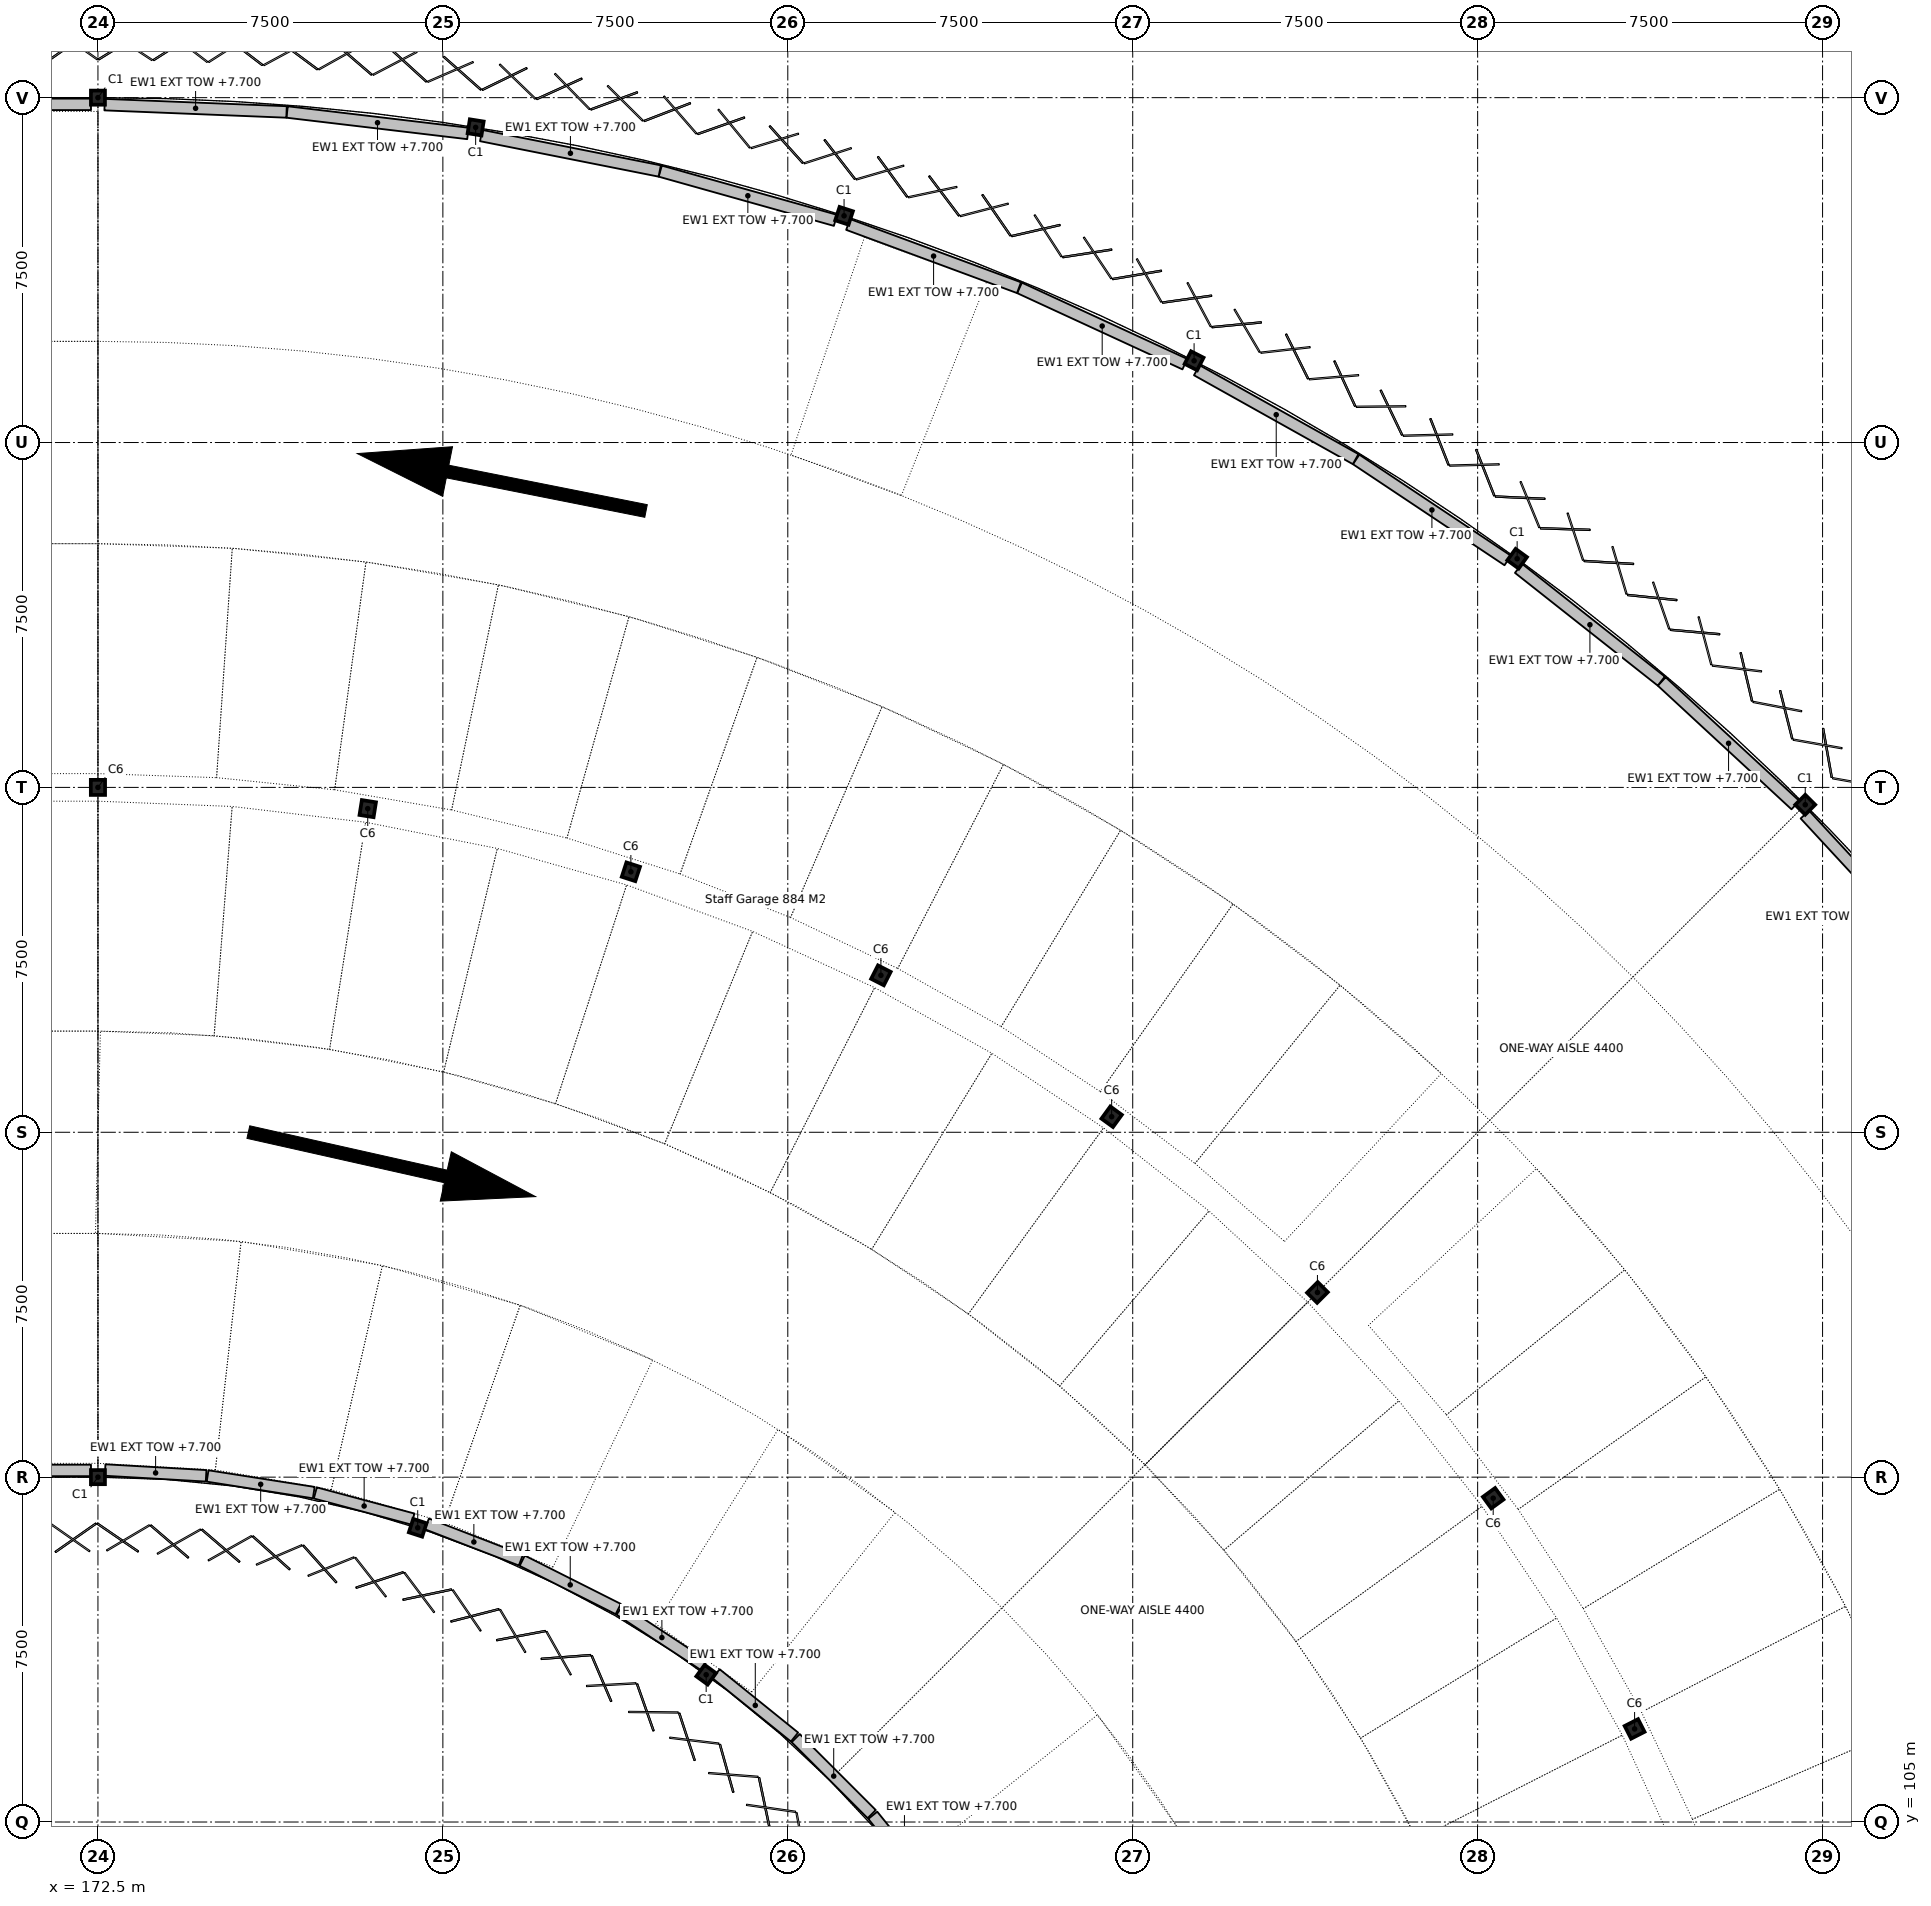
"""IFC4 building model, lengths in metres.
Left out: names, types, materials, properties, quantities, classifications, styles, units other than length and angle.
Written with IfcOpenShell. Run it as: python <this file> out.ifc"""

import sys

from ifc_helpers import new_model, si_unit, direction, frame, frame_2d, origin, origin_2d, place, context, subcontext, project, spatial, rectangle, i_section, extrude, element, save


model = new_model("IFC4")
c1 = context("Model", 3, precision=1e-05, world=origin(), true_north=direction((0.0, 1.0)))
c2 = subcontext(c1, "Body", "Model", "MODEL_VIEW")
j1 = project(units=[si_unit("LENGTHUNIT", "METRE"), si_unit("PLANEANGLEUNIT", "RADIAN")], contexts=[c1])
p1 = place(None, origin())
s1 = spatial("IfcSite", under=j1, at=p1, CompositionType="ELEMENT")
p2 = place(p1, origin())
s2 = spatial("IfcBuilding", under=s1, at=p2, CompositionType="ELEMENT")
p3 = place(p2, frame((0.0, 0.0, 6.6)))
s3 = spatial("IfcBuildingStorey", under=s2, at=p3, CompositionType="ELEMENT", Elevation=6.6)
p4 = place(p3, frame((172.5, 112.5, 0.0), z_axis=(0.0, 0.0, 1.0), x_axis=(1.0, 0.0, 0.0)))
e1 = element("IfcColumn", 1, at=p4, inside=s3, PredefinedType="COLUMN", context=c2, shape_type="SweptSolid", body=[
    extrude(i_section(OverallWidth=0.305, OverallDepth=0.307, WebThickness=0.01, FlangeThickness=0.015, FilletRadius=0.015, at=origin_2d()), origin(), (0.0, 0.0, 1.0), 3.3),
])
p5 = place(p3, frame((172.5, 127.5, 0.0), z_axis=(0.0, 0.0, 1.0), x_axis=(1.0, 0.0, 0.0)))
e2 = element("IfcColumn", 2, at=p5, inside=s3, PredefinedType="COLUMN", context=c2, shape_type="SweptSolid", body=[
    extrude(i_section(OverallWidth=0.31, OverallDepth=0.328, WebThickness=0.015, FlangeThickness=0.025, FilletRadius=0.015, at=origin_2d()), origin(), (0.0, 0.0, 1.0), 3.3),
])
for number, where, z_axis, x_axis in (
    (3, (172.5, 142.5, 0.0), (0.0, 0.0, 1.0), (1.0, 0.0, 0.0)),
    (4, (179.453, 111.399, 0.0), (0.0, 0.0, 1.0), (-0.951, 0.309, 0.0)),
    (5, (185.725, 108.203, 0.0), (0.0, 0.0, 1.0), (-0.809, 0.588, 0.0)),
):
    element("IfcColumn", number, at=place(p3, frame(where, z_axis=z_axis, x_axis=x_axis)), inside=s3, PredefinedType="COLUMN", context=c2, shape_type="SweptSolid", body=[
        extrude(i_section(OverallWidth=0.305, OverallDepth=0.307, WebThickness=0.01, FlangeThickness=0.015, FilletRadius=0.015, at=origin_2d()), origin(), (0.0, 0.0, 1.0), 3.3),
    ])
for number, where, z_axis, x_axis in (
    (6, (178.366, 127.038, 0.0), (0.0, 0.0, 1.0), (-0.988, 0.156, 0.0)),
    (7, (184.088, 125.665, 0.0), (0.0, 0.0, 1.0), (-0.951, 0.309, 0.0)),
    (8, (189.525, 123.413, 0.0), (0.0, 0.0, 1.0), (-0.891, 0.454, 0.0)),
    (9, (194.542, 120.338, 0.0), (0.0, 0.0, 1.0), (-0.809, 0.588, 0.0)),
    (10, (199.017, 116.517, 0.0), (0.0, 0.0, 1.0), (-0.707, 0.707, 0.0)),
    (11, (202.838, 112.042, 0.0), (0.0, 0.0, 1.0), (-0.588, 0.809, 0.0)),
    (12, (205.913, 107.025, 0.0), (0.0, 0.0, 1.0), (-0.454, 0.891, 0.0)),
):
    element("IfcColumn", number, at=place(p3, frame(where, z_axis=z_axis, x_axis=x_axis)), inside=s3, PredefinedType="COLUMN", context=c2, shape_type="SweptSolid", body=[
        extrude(i_section(OverallWidth=0.31, OverallDepth=0.328, WebThickness=0.015, FlangeThickness=0.025, FilletRadius=0.015, at=origin_2d()), origin(), (0.0, 0.0, 1.0), 3.3),
    ])
for number, where, z_axis, x_axis in (
    (13, (180.713, 141.854, 0.0), (0.0, 0.0, 1.0), (-0.988, 0.156, 0.0)),
    (14, (188.723, 139.93, 0.0), (0.0, 0.0, 1.0), (-0.951, 0.309, 0.0)),
    (15, (196.334, 136.778, 0.0), (0.0, 0.0, 1.0), (-0.891, 0.454, 0.0)),
    (16, (203.359, 132.473, 0.0), (0.0, 0.0, 1.0), (-0.809, 0.588, 0.0)),
    (17, (209.623, 127.123, 0.0), (0.0, 0.0, 1.0), (-0.707, 0.707, 0.0)),
):
    element("IfcColumn", number, at=place(p3, frame(where, z_axis=z_axis, x_axis=x_axis)), inside=s3, PredefinedType="COLUMN", context=c2, shape_type="SweptSolid", body=[
        extrude(i_section(OverallWidth=0.305, OverallDepth=0.307, WebThickness=0.01, FlangeThickness=0.015, FilletRadius=0.015, at=origin_2d()), origin(), (0.0, 0.0, 1.0), 3.3),
    ])
p6 = place(p3, frame((165.152, 112.646, 0.0), z_axis=(0.0, 0.0, 1.0), x_axis=(1.0, 0.0, 0.0)))
e18 = element("IfcWall", 18, at=p6, inside=s3, PredefinedType="SOLIDWALL", context=c2, shape_type="SweptSolid", body=[
    extrude(rectangle(XDim=7.197, YDim=0.25, at=frame_2d((3.598, 0.0))), origin(), (0.0, 0.0, 1.0), 1.1),
])
p7 = place(p3, frame((172.656, 112.655, 0.0), z_axis=(0.0, 0.0, 1.0), x_axis=(0.998364643885, -0.057166754681, 0.0)))
e19 = element("IfcWall", 19, at=p7, inside=s3, PredefinedType="SOLIDWALL", context=c2, shape_type="SweptSolid", body=[
    extrude(rectangle(XDim=2.199, YDim=0.25, at=frame_2d((1.1, 0.0))), origin(), (0.0, 0.0, 1.0), 1.1),
])
p8 = place(p3, frame((174.884, 112.525, 0.0), z_axis=(0.0, 0.0, 1.0), x_axis=(0.987958694972, -0.154717862668, 0.0)))
e20 = element("IfcWall", 20, at=p8, inside=s3, PredefinedType="SOLIDWALL", context=c2, shape_type="SweptSolid", body=[
    extrude(rectangle(XDim=2.337, YDim=0.25, at=frame_2d((1.168, 0.0))), origin(), (0.0, 0.0, 1.0), 1.1),
])
p9 = place(p3, frame((177.227, 112.156, 0.0), z_axis=(0.0, 0.0, 1.0), x_axis=(0.965933668704, -0.258789775039, 0.0)))
e21 = element("IfcWall", 21, at=p9, inside=s3, PredefinedType="SOLIDWALL", context=c2, shape_type="SweptSolid", body=[
    extrude(rectangle(XDim=2.197, YDim=0.25, at=frame_2d((1.099, 0.0))), origin(), (0.0, 0.0, 1.0), 1.1),
])
p10 = place(p3, frame((179.652, 111.484, 0.0), z_axis=(0.0, 0.0, 1.0), x_axis=(0.933015016795, -0.359837433343, 0.0)))
e22 = element("IfcWall", 22, at=p10, inside=s3, PredefinedType="SOLIDWALL", context=c2, shape_type="SweptSolid", body=[
    extrude(rectangle(XDim=2.191, YDim=0.25, at=frame_2d((1.096, 0.0))), origin(), (0.0, 0.0, 1.0), 1.1),
])
p11 = place(p3, frame((181.725, 110.682, 0.0), z_axis=(0.0, 0.0, 1.0), x_axis=(0.89321234847, -0.449635074856, 0.0)))
e23 = element("IfcWall", 23, at=p11, inside=s3, PredefinedType="SOLIDWALL", context=c2, shape_type="SweptSolid", body=[
    extrude(rectangle(XDim=2.337, YDim=0.25, at=frame_2d((1.169, 0.0))), origin(), (0.0, 0.0, 1.0), 1.1),
])
p12 = place(p3, frame((183.845, 109.613, 0.0), z_axis=(0.0, 0.0, 1.0), x_axis=(0.835931493831, -0.548833797813, 0.0)))
e24 = element("IfcWall", 24, at=p12, inside=s3, PredefinedType="SOLIDWALL", context=c2, shape_type="SweptSolid", body=[
    extrude(rectangle(XDim=2.195, YDim=0.25, at=frame_2d((1.097, 0.0))), origin(), (0.0, 0.0, 1.0), 1.1),
])
p13 = place(p3, frame((185.94, 108.225, 0.0), z_axis=(0.0, 0.0, 1.0), x_axis=(0.7781901536, -0.628028729311, 0.0)))
e25 = element("IfcWall", 25, at=p13, inside=s3, PredefinedType="SOLIDWALL", context=c2, shape_type="SweptSolid", body=[
    extrude(rectangle(XDim=2.193, YDim=0.25, at=frame_2d((1.097, 0.0))), origin(), (0.0, 0.0, 1.0), 1.1),
])
p14 = place(p3, frame((187.672, 106.824, 0.0), z_axis=(0.0, 0.0, 1.0), x_axis=(0.707106781187, -0.707106781187, 0.0)))
e26 = element("IfcWall", 26, at=p14, inside=s3, PredefinedType="SOLIDWALL", context=c2, shape_type="SweptSolid", body=[
    extrude(rectangle(XDim=2.337, YDim=0.25, at=frame_2d((1.168, 0.0))), origin(), (0.0, 0.0, 1.0), 1.1),
])
p15 = place(p3, frame((189.348, 105.146, 0.0), z_axis=(0.0, 0.0, 1.0), x_axis=(0.628070132688, -0.778156737698, 0.0)))
e27 = element("IfcWall", 27, at=p15, inside=s3, PredefinedType="SOLIDWALL", context=c2, shape_type="SweptSolid", body=[
    extrude(rectangle(XDim=2.193, YDim=0.25, at=frame_2d((1.096, 0.0))), origin(), (0.0, 0.0, 1.0), 1.1),
])
for number, where, z_axis, x_axis in (
    (28, (212.303, 124.003, 0.0), (0.0, 0.0, 1.0), (-0.679, 0.734, 0.0)),
    (29, (209.409, 127.115, 0.0), (0.0, 0.0, 1.0), (-0.734, 0.679, 0.0)),
):
    element("IfcWall", number, at=place(p3, frame(where, z_axis=z_axis, x_axis=x_axis)), inside=s3, PredefinedType="SOLIDWALL", context=c2, shape_type="SweptSolid", body=[
        extrude(rectangle(XDim=3.958, YDim=0.25, at=frame_2d((1.979, 0.0))), origin(), (0.0, 0.0, 1.0), 1.1),
    ])
p16 = place(p3, frame((206.494, 129.811, 0.0), z_axis=(0.0, 0.0, 1.0), x_axis=(-0.784694773209, 0.619882337946, 0.0)))
e30 = element("IfcWall", 30, at=p16, inside=s3, PredefinedType="SOLIDWALL", context=c2, shape_type="SweptSolid", body=[
    extrude(rectangle(XDim=3.957, YDim=0.25, at=frame_2d((1.978, 0.0))), origin(), (0.0, 0.0, 1.0), 1.1),
])
p17 = place(p3, frame((203.154, 132.435, 0.0), z_axis=(0.0, 0.0, 1.0), x_axis=(-0.83203132877, 0.554728643524, 0.0)))
e31 = element("IfcWall", 31, at=p17, inside=s3, PredefinedType="SOLIDWALL", context=c2, shape_type="SweptSolid", body=[
    extrude(rectangle(XDim=3.961, YDim=0.25, at=frame_2d((1.98, 0.0))), origin(), (0.0, 0.0, 1.0), 1.1),
])
p18 = place(p3, frame((199.847, 134.639, 0.0), z_axis=(0.0, 0.0, 1.0), x_axis=(-0.872675295028, 0.488300961957, 0.0)))
e32 = element("IfcWall", 32, at=p18, inside=s3, PredefinedType="SOLIDWALL", context=c2, shape_type="SweptSolid", body=[
    extrude(rectangle(XDim=3.958, YDim=0.25, at=frame_2d((1.979, 0.0))), origin(), (0.0, 0.0, 1.0), 1.1),
])
p19 = place(p3, frame((196.133, 136.704, 0.0), z_axis=(0.0, 0.0, 1.0), x_axis=(-0.907988262617, 0.418995602542, 0.0)))
e33 = element("IfcWall", 33, at=p19, inside=s3, PredefinedType="SOLIDWALL", context=c2, shape_type="SweptSolid", body=[
    extrude(rectangle(XDim=3.959, YDim=0.25, at=frame_2d((1.979, 0.0))), origin(), (0.0, 0.0, 1.0), 1.1),
])
p20 = place(p3, frame((192.527, 138.367, 0.0), z_axis=(0.0, 0.0, 1.0), x_axis=(-0.93784539105, 0.347053342422, 0.0)))
e34 = element("IfcWall", 34, at=p20, inside=s3, PredefinedType="SOLIDWALL", context=c2, shape_type="SweptSolid", body=[
    extrude(rectangle(XDim=3.96, YDim=0.25, at=frame_2d((1.98, 0.0))), origin(), (0.0, 0.0, 1.0), 1.1),
])
p21 = place(p3, frame((188.536, 139.832, 0.0), z_axis=(0.0, 0.0, 1.0), x_axis=(-0.962732314644, 0.270456078393, 0.0)))
e35 = element("IfcWall", 35, at=p21, inside=s3, PredefinedType="SOLIDWALL", context=c2, shape_type="SweptSolid", body=[
    extrude(rectangle(XDim=3.957, YDim=0.25, at=frame_2d((1.978, 0.0))), origin(), (0.0, 0.0, 1.0), 1.1),
])
p22 = place(p3, frame((184.715, 140.905, 0.0), z_axis=(0.0, 0.0, 1.0), x_axis=(-0.980850156695, 0.194763882975, 0.0)))
e36 = element("IfcWall", 36, at=p22, inside=s3, PredefinedType="SOLIDWALL", context=c2, shape_type="SweptSolid", body=[
    extrude(rectangle(XDim=3.959, YDim=0.25, at=frame_2d((1.979, 0.0))), origin(), (0.0, 0.0, 1.0), 1.1),
])
p23 = place(p3, frame((180.544, 141.721, 0.0), z_axis=(0.0, 0.0, 1.0), x_axis=(-0.993030098497, 0.117861034608, 0.0)))
e37 = element("IfcWall", 37, at=p23, inside=s3, PredefinedType="SOLIDWALL", context=c2, shape_type="SweptSolid", body=[
    extrude(rectangle(XDim=3.958, YDim=0.25, at=frame_2d((1.979, 0.0))), origin(), (0.0, 0.0, 1.0), 1.1),
])
p24 = place(p3, frame((176.601, 142.189, 0.0), z_axis=(0.0, 0.0, 1.0), x_axis=(-0.999191275027, 0.040209400773, 0.0)))
e38 = element("IfcWall", 38, at=p24, inside=s3, PredefinedType="SOLIDWALL", context=c2, shape_type="SweptSolid", body=[
    extrude(rectangle(XDim=3.959, YDim=0.25, at=frame_2d((1.979, 0.0))), origin(), (0.0, 0.0, 1.0), 1.1),
])
p25 = place(p3, frame((172.348, 142.354, 0.0), z_axis=(0.0, 0.0, 1.0), x_axis=(-1.0, 0.0, 0.0)))
e39 = element("IfcWall", 39, at=p25, inside=s3, PredefinedType="SOLIDWALL", context=c2, shape_type="SweptSolid", body=[
    extrude(rectangle(XDim=7.197, YDim=0.25, at=frame_2d((3.598, 0.0))), origin(), (0.0, 0.0, 1.0), 1.1),
])
save(model, sys.argv[1])
